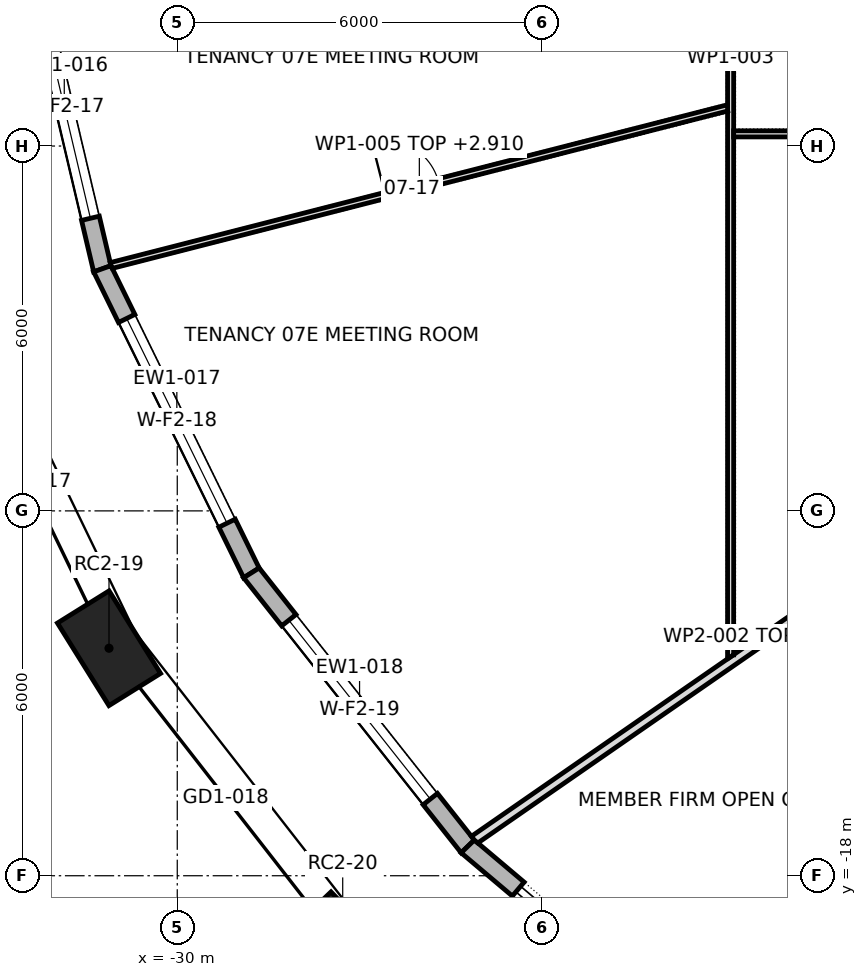
"""IFC4 building model, lengths in metres.
Left out: names, types, materials, properties, quantities, classifications, styles, units other than length and angle.
Written with IfcOpenShell. Run it as: python <this file> out.ifc"""

import sys

from ifc_helpers import new_model, si_unit, direction, frame, frame_2d, origin, origin_2d, place, context, subcontext, project, spatial, polyline, rectangle, outline, extrude, element, fill, save


model = new_model("IFC4")
c1 = context("Model", 3, precision=1e-05, world=origin(), true_north=direction((0.0, 1.0)))
c2 = subcontext(c1, "Body", "Model", "MODEL_VIEW")
j1 = project(units=[si_unit("LENGTHUNIT", "METRE"), si_unit("PLANEANGLEUNIT", "RADIAN")], contexts=[c1])
p1 = place(None, origin())
s1 = spatial("IfcSite", under=j1, at=p1, CompositionType="ELEMENT")
p2 = place(p1, origin())
s2 = spatial("IfcBuilding", under=s1, at=p2, CompositionType="ELEMENT")
p3 = place(p2, frame((0.0, 0.0, 104.5)))
s3 = spatial("IfcBuildingStorey", under=s2, at=p3, CompositionType="ELEMENT", Elevation=104.5)
for number, where, z_axis, x_axis in (
    (1, (-31.123, -14.259, 0.0), (0.0, 0.0, 1.0), (0.529, -0.849, 0.0)),
    (2, (-27.279, -19.189, 0.0), (0.0, 0.0, 1.0), (0.692, -0.722, 0.0)),
):
    element("IfcColumn", number, at=place(p3, frame(where, z_axis=z_axis, x_axis=x_axis)), inside=s3, PredefinedType="COLUMN", context=c2, shape_type="SweptSolid", body=[
        extrude(rectangle(XDim=1.6, YDim=1.0, at=origin_2d()), origin(), (0.0, 0.0, 1.0), 4.2),
    ])
p4 = place(p3, frame((-32.483, -2.708, 0.0), z_axis=(0.0, 0.0, 1.0), x_axis=(0.229193964616, -0.973380771632, 0.0)))
e3 = element("IfcWall", 3, at=p4, inside=s3, PredefinedType="STANDARD", context=c2, shape_type="SweptSolid", body=[
    extrude(outline(polyline([(-0.017, -0.15), (5.473, -0.15), (5.439, 0.15), (0.017, 0.15), (-0.017, -0.15)])), origin(), (0.0, 0.0, 1.0), 3.9),
])
p5 = place(p4, frame((0.853, 0.0, 0.6)))
e4 = element("IfcOpeningElement", 4, at=p5, cuts=e3, PredefinedType="OPENING", context=c2, shape_type="SweptSolid", body=[
    extrude(rectangle(XDim=3.75, YDim=2.85, at=frame_2d((1.875, 1.425))), frame((0.0, 0.162, 0.0), z_axis=(0.0, -1.0, 0.0), x_axis=(1.0, 0.0, 0.0)), (0.0, 0.0, 1.0), 0.324),
])
p6 = place(p3, frame((-31.233, -8.019, 0.0), z_axis=(0.0, 0.0, 1.0), x_axis=(0.440238988749, -0.897880633929, 0.0)))
e5 = element("IfcWall", 5, at=p6, inside=s3, PredefinedType="STANDARD", context=c2, shape_type="SweptSolid", body=[
    extrude(outline(polyline([(-0.017, -0.15), (5.586, -0.15), (5.553, 0.15), (0.017, 0.15), (-0.017, -0.15)])), origin(), (0.0, 0.0, 1.0), 3.9),
])
p7 = place(p6, frame((0.91, 0.0, 0.6)))
e6 = element("IfcOpeningElement", 6, at=p7, cuts=e5, PredefinedType="OPENING", context=c2, shape_type="SweptSolid", body=[
    extrude(rectangle(XDim=3.75, YDim=2.85, at=frame_2d((1.875, 1.425))), frame((0.0, 0.162, 0.0), z_axis=(0.0, -1.0, 0.0), x_axis=(1.0, 0.0, 0.0)), (0.0, 0.0, 1.0), 0.324),
])
p8 = place(p3, frame((-28.781, -13.019, 0.0), z_axis=(0.0, 0.0, 1.0), x_axis=(0.620329992039, -0.784340934146, 0.0)))
e7 = element("IfcWall", 7, at=p8, inside=s3, PredefinedType="STANDARD", context=c2, shape_type="SweptSolid", body=[
    extrude(outline(polyline([(-0.016, -0.15), (5.75, -0.15), (5.72, 0.15), (0.016, 0.15), (-0.016, -0.15)])), origin(), (0.0, 0.0, 1.0), 3.9),
])
p9 = place(p8, frame((0.993, 0.0, 0.6)))
e8 = element("IfcOpeningElement", 8, at=p9, cuts=e7, PredefinedType="OPENING", context=c2, shape_type="SweptSolid", body=[
    extrude(rectangle(XDim=3.75, YDim=2.85, at=frame_2d((1.875, 1.425))), frame((0.0, 0.162, 0.0), z_axis=(0.0, -1.0, 0.0), x_axis=(1.0, 0.0, 0.0)), (0.0, 0.0, 1.0), 0.324),
])
p10 = place(p3, frame((-25.223, -17.518, 0.0), z_axis=(0.0, 0.0, 1.0), x_axis=(0.763894031266, -0.645341699409, 0.0)))
e9 = element("IfcWall", 9, at=p10, inside=s3, PredefinedType="STANDARD", context=c2, shape_type="SweptSolid", body=[
    extrude(outline(polyline([(-0.015, -0.15), (5.939, -0.15), (5.911, 0.15), (0.015, 0.15), (-0.015, -0.15)])), origin(), (0.0, 0.0, 1.0), 3.9),
])
p11 = place(p10, frame((1.087, 0.0, 0.0)))
e10 = element("IfcOpeningElement", 10, at=p11, cuts=e9, PredefinedType="OPENING", context=c2, shape_type="SweptSolid", body=[
    extrude(rectangle(XDim=3.75, YDim=3.45, at=frame_2d((1.875, 1.725))), frame((0.0, 0.162, 0.0), z_axis=(0.0, -1.0, 0.0), x_axis=(1.0, 0.0, 0.0)), (0.0, 0.0, 1.0), 0.324),
])
p12 = place(p3, frame((-25.12, -17.414, 0.0), z_axis=(0.0, 0.0, 1.0), x_axis=(0.822008683907, 0.569474954306, 0.0)))
e11 = element("IfcWall", 11, at=p12, inside=s3, PredefinedType="PARTITIONING", context=c2, shape_type="SweptSolid", body=[
    extrude(outline(polyline([(0.024, -0.075), (1.967, -0.075), (3.91, -0.075), (5.853, -0.075), (7.796, -0.075), (9.739, -0.075), (11.681, -0.075), (11.734, 0.002), (11.734, 0.002), (11.785, 0.074), (11.785, 0.075), (10.15, 0.075), (8.516, 0.075), (6.881, 0.075), (5.246, 0.075), (5.245, 0.072), (5.241, 0.075), (3.494, 0.075), (1.747, 0.075), (0.0, 0.075), (0.0, 0.07), (0.005, -0.002), (0.024, -0.075)])), origin(), (0.0, 0.0, 1.0), 3.13),
])
p13 = place(p3, frame((-20.9, -14.434, 0.0), z_axis=(0.0, 0.0, 1.0), x_axis=(0.0, 1.0, 0.0)))
e12 = element("IfcWall", 12, at=p13, inside=s3, PredefinedType="PARTITIONING", context=c2, shape_type="SweptSolid", body=[
    extrude(outline(polyline([(0.069, -0.05), (1.772, -0.05), (3.475, -0.05), (5.178, -0.05), (6.881, -0.05), (8.583, -0.05), (8.583, -0.05), (8.684, -0.05), (8.684, -0.05), (10.321, -0.05), (11.958, -0.05), (13.596, -0.05), (15.234, -0.05), (15.234, -0.05), (15.333, -0.05), (15.333, -0.05), (16.789, -0.05), (18.245, -0.05), (19.701, -0.05), (19.727, 0.05), (19.727, 0.05), (17.942, 0.05), (16.156, 0.05), (14.372, 0.05), (12.587, 0.05), (10.802, 0.05), (9.017, 0.05), (9.01, 0.048), (9.009, 0.05), (7.208, 0.05), (5.406, 0.05), (3.604, 0.05), (1.802, 0.05), (0.0, 0.05), (0.069, -0.05)])), origin(), (0.0, 0.0, 1.0), 3.9),
])
p14 = place(p13, frame((13.539, 0.0, 0.0)))
e13 = element("IfcOpeningElement", 13, at=p14, cuts=e12, PredefinedType="OPENING", context=c2, shape_type="SweptSolid", body=[
    extrude(rectangle(XDim=0.9, YDim=2.1, at=frame_2d((0.45, 1.05))), frame((0.0, 0.062, 0.0), z_axis=(0.0, -1.0, 0.0), x_axis=(1.0, 0.0, 0.0)), (0.0, 0.0, 1.0), 0.124),
])
p15 = place(p3, frame((-20.85, -5.8, 0.0), z_axis=(0.0, 0.0, 1.0), x_axis=(1.0, 0.0, 0.0)))
e14 = element("IfcWall", 14, at=p15, inside=s3, PredefinedType="PARTITIONING", context=c2, shape_type="SweptSolid", body=[
    extrude(rectangle(XDim=5.375, YDim=0.1, at=frame_2d((2.688, 0.0))), origin(), (0.0, 0.0, 1.0), 3.9),
])
p16 = place(p3, frame((-20.938, -5.37, 0.0), z_axis=(0.0, 0.0, 1.0), x_axis=(-0.968822345516, -0.247756458702, 0.0)))
e15 = element("IfcWall", 15, at=p16, inside=s3, PredefinedType="PARTITIONING", context=c2, shape_type="SweptSolid", body=[
    extrude(outline(polyline([(10.479, -0.05), (10.479, 0.007), (10.47, 0.05), (8.729, 0.05), (6.988, 0.05), (5.248, 0.05), (3.507, 0.05), (1.766, 0.05), (0.025, 0.05), (0.0, -0.05), (0.0, -0.05), (1.747, -0.05), (3.493, -0.05), (5.239, -0.05), (6.986, -0.05), (8.732, -0.05), (10.479, -0.05)])), origin(), (0.0, 0.0, 1.0), 2.91),
])
p17 = place(p16, frame((4.92, 0.0, 0.0)))
e16 = element("IfcOpeningElement", 16, at=p17, cuts=e15, PredefinedType="OPENING", context=c2, shape_type="SweptSolid", body=[
    extrude(rectangle(XDim=0.9, YDim=2.1, at=frame_2d((0.45, 1.05))), frame((0.0, 0.062, 0.0), z_axis=(0.0, -1.0, 0.0), x_axis=(1.0, 0.0, 0.0)), (0.0, 0.0, 1.0), 0.124),
])
p18 = place(p5, origin())
e17 = element("IfcWindow", 17, at=p18, inside=s3, PartitioningType="TRIPLE_PANEL_VERTICAL", PredefinedType="WINDOW", context=c2, shape_type="SweptSolid", body=[
    extrude(rectangle(XDim=3.75, YDim=2.85, at=frame_2d((1.875, 1.425))), frame((0.0, 0.03, 0.0), z_axis=(0.0, -1.0, 0.0), x_axis=(1.0, 0.0, 0.0)), (0.0, 0.0, 1.0), 0.06),
])
fill(e4, e17)
p19 = place(p7, origin())
e18 = element("IfcWindow", 18, at=p19, inside=s3, PartitioningType="TRIPLE_PANEL_VERTICAL", PredefinedType="WINDOW", context=c2, shape_type="SweptSolid", body=[
    extrude(rectangle(XDim=3.75, YDim=2.85, at=frame_2d((1.875, 1.425))), frame((0.0, 0.03, 0.0), z_axis=(0.0, -1.0, 0.0), x_axis=(1.0, 0.0, 0.0)), (0.0, 0.0, 1.0), 0.06),
])
fill(e6, e18)
p20 = place(p9, origin())
e19 = element("IfcWindow", 19, at=p20, inside=s3, PartitioningType="TRIPLE_PANEL_VERTICAL", PredefinedType="WINDOW", context=c2, shape_type="SweptSolid", body=[
    extrude(rectangle(XDim=3.75, YDim=2.85, at=frame_2d((1.875, 1.425))), frame((0.0, 0.03, 0.0), z_axis=(0.0, -1.0, 0.0), x_axis=(1.0, 0.0, 0.0)), (0.0, 0.0, 1.0), 0.06),
])
fill(e8, e19)
p21 = place(p11, origin())
e20 = element("IfcDoor", 20, at=p21, inside=s3, OperationType="DOUBLE_DOOR_SLIDING", PredefinedType="DOOR", context=c2, shape_type="SweptSolid", body=[
    extrude(rectangle(XDim=3.75, YDim=3.45, at=frame_2d((1.875, 1.725))), frame((0.0, 0.025, 0.0), z_axis=(0.0, -1.0, 0.0), x_axis=(1.0, 0.0, 0.0)), (0.0, 0.0, 1.0), 0.05),
])
fill(e10, e20)
p22 = place(p17, frame((0.9, 0.0, 0.0), z_axis=(0.0, 0.0, 1.0), x_axis=(-1.0, 0.0, 0.0)))
e21 = element("IfcDoor", 21, at=p22, inside=s3, OperationType="SINGLE_SWING_RIGHT", PredefinedType="DOOR", context=c2, shape_type="SweptSolid", body=[
    extrude(rectangle(XDim=0.9, YDim=2.1, at=frame_2d((0.45, 1.05))), frame((0.0, 0.025, 0.0), z_axis=(0.0, -1.0, 0.0), x_axis=(1.0, 0.0, 0.0)), (0.0, 0.0, 1.0), 0.05),
])
fill(e16, e21)
save(model, sys.argv[1])
